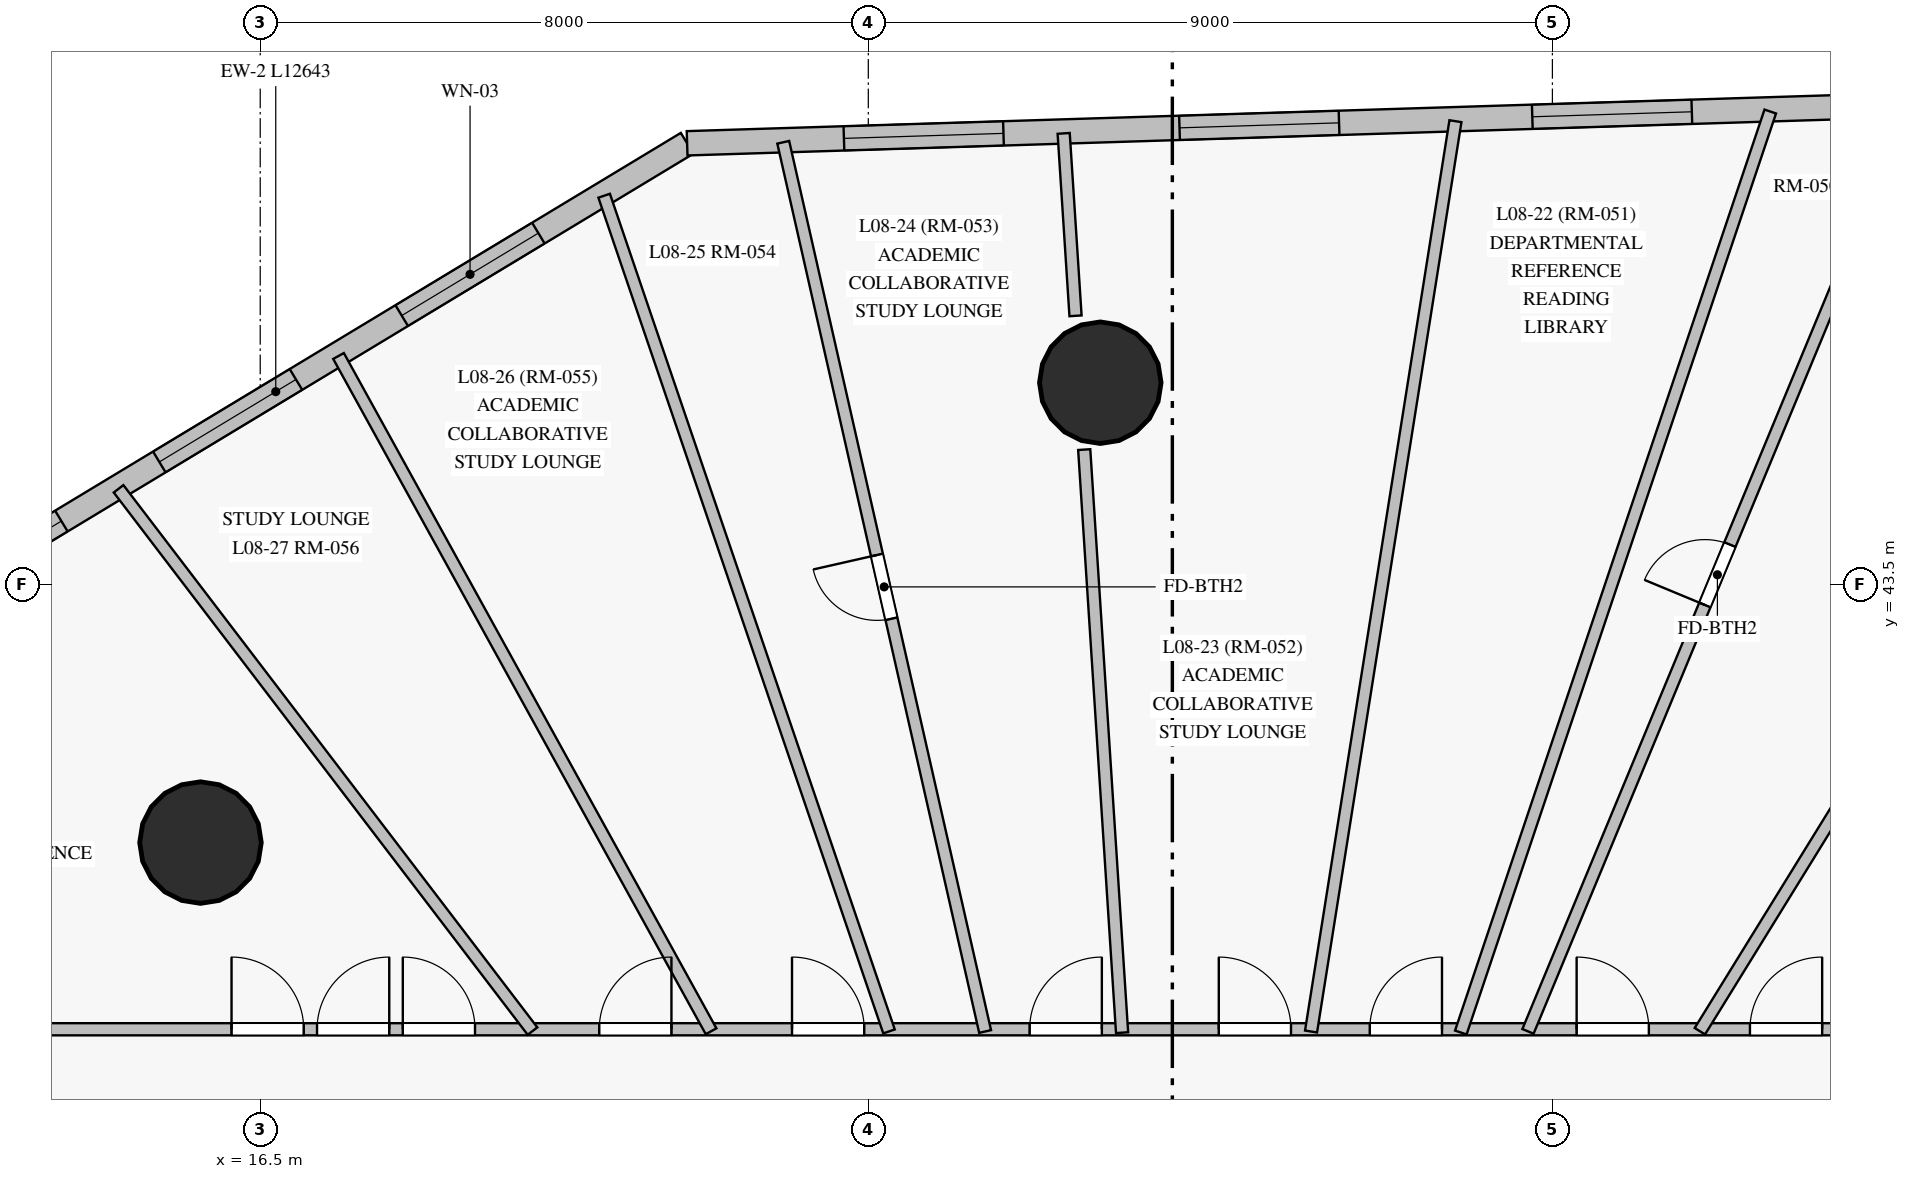
"""IFC4 building model, lengths in metres.
Left out: names, types, materials, properties, quantities, classifications, styles, units other than length and angle.
Written with IfcOpenShell. Run it as: python <this file> out.ifc"""

import sys

from ifc_helpers import new_model, si_unit, direction, frame, frame_2d, origin, origin_with_axes, origin_2d, place, context, subcontext, project, spatial, rectangle, circle, extrude, source, transform, mapped, element, fill, save


model = new_model("IFC4")
c1 = context("Model", 3, precision=1e-05, world=origin(), true_north=direction((0.0, 1.0)))
c2 = subcontext(c1, "Body", "Model", "MODEL_VIEW")
j1 = project(units=[si_unit("LENGTHUNIT", "METRE"), si_unit("PLANEANGLEUNIT", "RADIAN")], contexts=[c1])
p1 = place(None, origin())
s1 = spatial("IfcSite", under=j1, at=p1, CompositionType="ELEMENT")
p2 = place(p1, origin())
s2 = spatial("IfcBuilding", under=s1, at=p2, CompositionType="ELEMENT")
p3 = place(p2, frame((0.0, 0.0, 33.7)))
s3 = spatial("IfcBuildingStorey", under=s2, at=p3, CompositionType="ELEMENT", Elevation=33.7)
m1 = source(origin_with_axes(), c2, "Body", "SweptSolid", [
    extrude(circle(Radius=0.8, at=origin_2d()), origin(), (0.0, 0.0, 1.0), 3.6),
])
for number, where, z_axis, x_axis in (
    (1, (27.552, 46.156, 0.0), (0.0, 0.0, 1.0), (1.0, 0.0, 0.0)),
    (2, (15.714, 40.106, 0.0), (0.0, 0.0, 1.0), (1.0, 0.0, 0.0)),
):
    element("IfcColumn", number, at=place(p3, frame(where, z_axis=z_axis, x_axis=x_axis)), inside=s3, PredefinedType="COLUMN", context=c2, shape_type="MappedRepresentation", body=[
        mapped(m1, transform((0.0, 0.0, 0.0), scale=1.0)),
    ])
p4 = place(p3, frame((22.116, 49.306, 0.0), z_axis=(0.0, 0.0, 1.0), x_axis=(-0.856078953707, -0.516845068681, 0.0)))
e3 = element("IfcWall", 3, at=p4, inside=s3, PredefinedType="SOLIDWALL", context=c2, shape_type="SweptSolid", body=[
    extrude(rectangle(XDim=12.643, YDim=0.32, at=frame_2d((6.322, 0.0))), origin(), (0.0, 0.0, 1.0), 3.35),
])
p5 = place(p4, frame((2.286, 0.0, 0.85)))
e4 = element("IfcOpeningElement", 4, at=p5, cuts=e3, PredefinedType="OPENING", context=c2, shape_type="SweptSolid", body=[
    extrude(rectangle(XDim=2.1, YDim=1.95, at=frame_2d((1.05, 0.975))), frame((0.0, 0.17, 0.0), z_axis=(0.0, -1.0, 0.0), x_axis=(1.0, 0.0, 0.0)), (0.0, 0.0, 1.0), 0.34),
])
p6 = place(p4, frame((6.011, 0.0, 0.85)))
e5 = element("IfcOpeningElement", 5, at=p6, cuts=e3, PredefinedType="OPENING", context=c2, shape_type="SweptSolid", body=[
    extrude(rectangle(XDim=2.1, YDim=1.95, at=frame_2d((1.05, 0.975))), frame((0.0, 0.17, 0.0), z_axis=(0.0, -1.0, 0.0), x_axis=(1.0, 0.0, 0.0)), (0.0, 0.0, 1.0), 0.34),
])
p7 = place(p4, frame((9.616, 0.0, 0.85)))
e6 = element("IfcOpeningElement", 6, at=p7, cuts=e3, PredefinedType="OPENING", context=c2, shape_type="SweptSolid", body=[
    extrude(rectangle(XDim=2.1, YDim=1.95, at=frame_2d((1.05, 0.975))), frame((0.0, 0.17, 0.0), z_axis=(0.0, -1.0, 0.0), x_axis=(1.0, 0.0, 0.0)), (0.0, 0.0, 1.0), 0.34),
])
p8 = place(p3, frame((37.845, 49.799, 0.0), z_axis=(0.0, 0.0, 1.0), x_axis=(-0.999508801206, -0.031339373191, 0.0)))
e7 = element("IfcWall", 7, at=p8, inside=s3, PredefinedType="SOLIDWALL", context=c2, shape_type="SweptSolid", body=[
    extrude(rectangle(XDim=15.736, YDim=0.32, at=frame_2d((7.868, 0.0))), origin(), (0.0, 0.0, 1.0), 3.35),
])
p9 = place(p8, frame((2.511, 0.0, 0.85)))
e8 = element("IfcOpeningElement", 8, at=p9, cuts=e7, PredefinedType="OPENING", context=c2, shape_type="SweptSolid", body=[
    extrude(rectangle(XDim=2.1, YDim=1.95, at=frame_2d((1.05, 0.975))), frame((0.0, 0.17, 0.0), z_axis=(0.0, -1.0, 0.0), x_axis=(1.0, 0.0, 0.0)), (0.0, 0.0, 1.0), 0.34),
])
p10 = place(p8, frame((7.155, 0.0, 0.85)))
e9 = element("IfcOpeningElement", 9, at=p10, cuts=e7, PredefinedType="OPENING", context=c2, shape_type="SweptSolid", body=[
    extrude(rectangle(XDim=2.1, YDim=1.95, at=frame_2d((1.05, 0.975))), frame((0.0, 0.17, 0.0), z_axis=(0.0, -1.0, 0.0), x_axis=(1.0, 0.0, 0.0)), (0.0, 0.0, 1.0), 0.34),
])
p11 = place(p8, frame((11.572, 0.0, 0.85)))
e10 = element("IfcOpeningElement", 10, at=p11, cuts=e7, PredefinedType="OPENING", context=c2, shape_type="SweptSolid", body=[
    extrude(rectangle(XDim=2.1, YDim=1.95, at=frame_2d((1.05, 0.975))), frame((0.0, 0.17, 0.0), z_axis=(0.0, -1.0, 0.0), x_axis=(1.0, 0.0, 0.0)), (0.0, 0.0, 1.0), 0.34),
])
p12 = place(p3, frame((10.5, 37.65, 0.0), z_axis=(0.0, 0.0, 1.0), x_axis=(1.0, 0.0, 0.0)))
e11 = element("IfcWall", 11, at=p12, inside=s3, PredefinedType="PARTITIONING", context=c2, shape_type="SweptSolid", body=[
    extrude(rectangle(XDim=29.75, YDim=0.16, at=frame_2d((14.875, 0.0))), origin(), (0.0, 0.0, 1.0), 2.75),
])
p13 = place(p12, frame((28.008, 0.0, 0.0)))
e12 = element("IfcOpeningElement", 12, at=p13, cuts=e11, PredefinedType="OPENING", context=c2, shape_type="SweptSolid", body=[
    extrude(rectangle(XDim=0.95, YDim=2.15, at=frame_2d((0.475, 1.075))), frame((0.0, 0.09, 0.0), z_axis=(0.0, -1.0, 0.0), x_axis=(1.0, 0.0, 0.0)), (0.0, 0.0, 1.0), 0.18),
])
p14 = place(p12, frame((25.599, 0.0, 0.0)))
e13 = element("IfcOpeningElement", 13, at=p14, cuts=e11, PredefinedType="OPENING", context=c2, shape_type="SweptSolid", body=[
    extrude(rectangle(XDim=0.95, YDim=2.15, at=frame_2d((0.475, 1.075))), frame((0.0, 0.09, 0.0), z_axis=(0.0, -1.0, 0.0), x_axis=(1.0, 0.0, 0.0)), (0.0, 0.0, 1.0), 0.18),
])
p15 = place(p12, frame((23.319, 0.0, 0.0)))
e14 = element("IfcOpeningElement", 14, at=p15, cuts=e11, PredefinedType="OPENING", context=c2, shape_type="SweptSolid", body=[
    extrude(rectangle(XDim=0.95, YDim=2.15, at=frame_2d((0.475, 1.075))), frame((0.0, 0.09, 0.0), z_axis=(0.0, -1.0, 0.0), x_axis=(1.0, 0.0, 0.0)), (0.0, 0.0, 1.0), 0.18),
])
p16 = place(p12, frame((20.597, 0.0, 0.0)))
e15 = element("IfcOpeningElement", 15, at=p16, cuts=e11, PredefinedType="OPENING", context=c2, shape_type="SweptSolid", body=[
    extrude(rectangle(XDim=0.95, YDim=2.15, at=frame_2d((0.475, 1.075))), frame((0.0, 0.09, 0.0), z_axis=(0.0, -1.0, 0.0), x_axis=(1.0, 0.0, 0.0)), (0.0, 0.0, 1.0), 0.18),
])
p17 = place(p12, frame((18.611, 0.0, 0.0)))
e16 = element("IfcOpeningElement", 16, at=p17, cuts=e11, PredefinedType="OPENING", context=c2, shape_type="SweptSolid", body=[
    extrude(rectangle(XDim=0.95, YDim=2.15, at=frame_2d((0.475, 1.075))), frame((0.0, 0.09, 0.0), z_axis=(0.0, -1.0, 0.0), x_axis=(1.0, 0.0, 0.0)), (0.0, 0.0, 1.0), 0.18),
])
p18 = place(p12, frame((16.123, 0.0, 0.0)))
e17 = element("IfcOpeningElement", 17, at=p18, cuts=e11, PredefinedType="OPENING", context=c2, shape_type="SweptSolid", body=[
    extrude(rectangle(XDim=0.95, YDim=2.15, at=frame_2d((0.475, 1.075))), frame((0.0, 0.09, 0.0), z_axis=(0.0, -1.0, 0.0), x_axis=(1.0, 0.0, 0.0)), (0.0, 0.0, 1.0), 0.18),
])
p19 = place(p12, frame((12.996, 0.0, 0.0)))
e18 = element("IfcOpeningElement", 18, at=p19, cuts=e11, PredefinedType="OPENING", context=c2, shape_type="SweptSolid", body=[
    extrude(rectangle(XDim=0.95, YDim=2.15, at=frame_2d((0.475, 1.075))), frame((0.0, 0.09, 0.0), z_axis=(0.0, -1.0, 0.0), x_axis=(1.0, 0.0, 0.0)), (0.0, 0.0, 1.0), 0.18),
])
p20 = place(p12, frame((10.46, 0.0, 0.0)))
e19 = element("IfcOpeningElement", 19, at=p20, cuts=e11, PredefinedType="OPENING", context=c2, shape_type="SweptSolid", body=[
    extrude(rectangle(XDim=0.95, YDim=2.15, at=frame_2d((0.475, 1.075))), frame((0.0, 0.09, 0.0), z_axis=(0.0, -1.0, 0.0), x_axis=(1.0, 0.0, 0.0)), (0.0, 0.0, 1.0), 0.18),
])
p21 = place(p12, frame((7.876, 0.0, 0.0)))
e20 = element("IfcOpeningElement", 20, at=p21, cuts=e11, PredefinedType="OPENING", context=c2, shape_type="SweptSolid", body=[
    extrude(rectangle(XDim=0.95, YDim=2.15, at=frame_2d((0.475, 1.075))), frame((0.0, 0.09, 0.0), z_axis=(0.0, -1.0, 0.0), x_axis=(1.0, 0.0, 0.0)), (0.0, 0.0, 1.0), 0.18),
])
p22 = place(p12, frame((6.748, 0.0, 0.0)))
e21 = element("IfcOpeningElement", 21, at=p22, cuts=e11, PredefinedType="OPENING", context=c2, shape_type="SweptSolid", body=[
    extrude(rectangle(XDim=0.95, YDim=2.15, at=frame_2d((0.475, 1.075))), frame((0.0, 0.09, 0.0), z_axis=(0.0, -1.0, 0.0), x_axis=(1.0, 0.0, 0.0)), (0.0, 0.0, 1.0), 0.18),
])
p23 = place(p12, frame((5.623, 0.0, 0.0)))
e22 = element("IfcOpeningElement", 22, at=p23, cuts=e11, PredefinedType="OPENING", context=c2, shape_type="SweptSolid", body=[
    extrude(rectangle(XDim=0.95, YDim=2.15, at=frame_2d((0.475, 1.075))), frame((0.0, 0.09, 0.0), z_axis=(0.0, -1.0, 0.0), x_axis=(1.0, 0.0, 0.0)), (0.0, 0.0, 1.0), 0.18),
])
p24 = place(p3, frame((33.179, 37.622, 0.0), z_axis=(0.0, 0.0, 1.0), x_axis=(0.383172838405, 0.923676661992, 0.0)))
e23 = element("IfcWall", 23, at=p24, inside=s3, PredefinedType="PARTITIONING", context=c2, shape_type="SweptSolid", body=[
    extrude(rectangle(XDim=13.007, YDim=0.16, at=frame_2d((6.503, 0.0))), origin(), (0.0, 0.0, 1.0), 3.35),
])
p25 = place(p24, frame((6.073, 0.0, 0.0)))
e24 = element("IfcOpeningElement", 24, at=p25, cuts=e23, PredefinedType="OPENING", context=c2, shape_type="SweptSolid", body=[
    extrude(rectangle(XDim=0.86, YDim=2.04, at=frame_2d((0.43, 1.02))), frame((0.0, 0.09, 0.0), z_axis=(0.0, -1.0, 0.0), x_axis=(1.0, 0.0, 0.0)), (0.0, 0.0, 1.0), 0.18),
])
p26 = place(p3, frame((32.295, 37.607, 0.0), z_axis=(0.0, 0.0, 1.0), x_axis=(0.318501732795, 0.947922278569, 0.0)))
e25 = element("IfcWall", 25, at=p26, inside=s3, PredefinedType="PARTITIONING", context=c2, shape_type="SweptSolid", body=[
    extrude(rectangle(XDim=12.782, YDim=0.16, at=frame_2d((6.391, 0.0))), origin(), (0.0, 0.0, 1.0), 3.35),
])
p27 = place(p3, frame((35.44, 37.625, 0.0), z_axis=(0.0, 0.0, 1.0), x_axis=(0.525421629301, 0.850842001468, 0.0)))
e26 = element("IfcWall", 26, at=p27, inside=s3, PredefinedType="PARTITIONING", context=c2, shape_type="SweptSolid", body=[
    extrude(rectangle(XDim=12.256, YDim=0.16, at=frame_2d((6.128, 0.0))), origin(), (0.0, 0.0, 1.0), 3.35),
])
p28 = place(p3, frame((30.325, 37.62, 0.0), z_axis=(0.0, 0.0, 1.0), x_axis=(0.156659374138, 0.987652692243, 0.0)))
e27 = element("IfcWall", 27, at=p28, inside=s3, PredefinedType="PARTITIONING", context=c2, shape_type="SweptSolid", body=[
    extrude(rectangle(XDim=12.126, YDim=0.16, at=frame_2d((6.063, 0.0))), origin(), (0.0, 0.0, 1.0), 3.35),
])
p29 = place(p3, frame((26.037, 37.621, 0.0), z_axis=(0.0, 0.0, 1.0), x_axis=(-0.221403828969, 0.975182210932, 0.0)))
e28 = element("IfcWall", 28, at=p29, inside=s3, PredefinedType="PARTITIONING", context=c2, shape_type="SweptSolid", body=[
    extrude(rectangle(XDim=11.996, YDim=0.16, at=frame_2d((5.998, 0.0))), origin(), (0.0, 0.0, 1.0), 3.35),
])
p30 = place(p29, frame((5.568, 0.0, 0.0)))
e29 = element("IfcOpeningElement", 29, at=p30, cuts=e28, PredefinedType="OPENING", context=c2, shape_type="SweptSolid", body=[
    extrude(rectangle(XDim=0.86, YDim=2.04, at=frame_2d((0.43, 1.02))), frame((0.0, 0.09, 0.0), z_axis=(0.0, -1.0, 0.0), x_axis=(1.0, 0.0, 0.0)), (0.0, 0.0, 1.0), 0.18),
])
p31 = place(p3, frame((24.772, 37.622, 0.0), z_axis=(0.0, 0.0, 1.0), x_axis=(-0.322633271711, 0.94652404723, 0.0)))
e30 = element("IfcWall", 30, at=p31, inside=s3, PredefinedType="PARTITIONING", context=c2, shape_type="SweptSolid", body=[
    extrude(rectangle(XDim=11.615, YDim=0.16, at=frame_2d((5.808, 0.0))), origin(), (0.0, 0.0, 1.0), 3.35),
])
p32 = place(p3, frame((22.432, 37.624, 0.0), z_axis=(0.0, 0.0, 1.0), x_axis=(-0.483064621036, 0.875584702872, 0.0)))
e31 = element("IfcWall", 31, at=p32, inside=s3, PredefinedType="PARTITIONING", context=c2, shape_type="SweptSolid", body=[
    extrude(rectangle(XDim=10.146, YDim=0.16, at=frame_2d((5.073, 0.0))), origin(), (0.0, 0.0, 1.0), 3.35),
])
p33 = place(p3, frame((20.082, 37.626, 0.0), z_axis=(0.0, 0.0, 1.0), x_axis=(-0.606772385427, 0.794875633218, 0.0)))
e32 = element("IfcWall", 32, at=p33, inside=s3, PredefinedType="PARTITIONING", context=c2, shape_type="SweptSolid", body=[
    extrude(rectangle(XDim=8.975, YDim=0.16, at=frame_2d((4.488, 0.0))), origin(), (0.0, 0.0, 1.0), 3.35),
])
p34 = place(p3, frame((27.839, 37.605, 0.0), z_axis=(0.0, 0.0, 1.0), x_axis=(-0.064822006833, 0.997896842078, 0.0)))
e33 = element("IfcWall", 33, at=p34, inside=s3, PredefinedType="PARTITIONING", context=c2, shape_type="SweptSolid", body=[
    extrude(rectangle(XDim=7.687, YDim=0.16, at=frame_2d((3.844, 0.0))), origin(), (0.0, 0.0, 1.0), 2.7),
])
p35 = place(p3, frame((27.226, 47.036, 0.0), z_axis=(0.0, 0.0, 1.0), x_axis=(-0.064861604916, 0.997894269052, 0.0)))
e34 = element("IfcWall", 34, at=p35, inside=s3, PredefinedType="PARTITIONING", context=c2, shape_type="SweptSolid", body=[
    extrude(rectangle(XDim=2.405, YDim=0.16, at=frame_2d((1.203, 0.0))), origin(), (0.0, 0.0, 1.0), 3.35),
])
m2 = source(origin_with_axes(), c2, "Body", "SweptSolid", [
    extrude(rectangle(XDim=2.1, YDim=1.95, at=frame_2d((1.05, 0.975))), frame((0.0, 0.03, 0.0), z_axis=(0.0, -1.0, 0.0), x_axis=(1.0, 0.0, 0.0)), (0.0, 0.0, 1.0), 0.06),
])
p36 = place(p5, origin())
e35 = element("IfcWindow", 35, at=p36, inside=s3, PartitioningType="SINGLE_PANEL", PredefinedType="WINDOW", context=c2, shape_type="MappedRepresentation", body=[
    mapped(m2, transform((0.0, 0.0, 0.0), scale=1.0)),
])
fill(e4, e35)
p37 = place(p6, origin())
e36 = element("IfcWindow", 36, at=p37, inside=s3, PartitioningType="SINGLE_PANEL", PredefinedType="WINDOW", context=c2, shape_type="MappedRepresentation", body=[
    mapped(m2, transform((0.0, 0.0, 0.0), scale=1.0)),
])
fill(e5, e36)
p38 = place(p7, origin())
e37 = element("IfcWindow", 37, at=p38, inside=s3, PartitioningType="SINGLE_PANEL", PredefinedType="WINDOW", context=c2, shape_type="MappedRepresentation", body=[
    mapped(m2, transform((0.0, 0.0, 0.0), scale=1.0)),
])
fill(e6, e37)
p39 = place(p9, origin())
e38 = element("IfcWindow", 38, at=p39, inside=s3, PartitioningType="SINGLE_PANEL", PredefinedType="WINDOW", context=c2, shape_type="MappedRepresentation", body=[
    mapped(m2, transform((0.0, 0.0, 0.0), scale=1.0)),
])
fill(e8, e38)
p40 = place(p10, origin())
e39 = element("IfcWindow", 39, at=p40, inside=s3, PartitioningType="SINGLE_PANEL", PredefinedType="WINDOW", context=c2, shape_type="MappedRepresentation", body=[
    mapped(m2, transform((0.0, 0.0, 0.0), scale=1.0)),
])
fill(e9, e39)
p41 = place(p11, origin())
e40 = element("IfcWindow", 40, at=p41, inside=s3, PartitioningType="SINGLE_PANEL", PredefinedType="WINDOW", context=c2, shape_type="MappedRepresentation", body=[
    mapped(m2, transform((0.0, 0.0, 0.0), scale=1.0)),
])
fill(e10, e40)
m3 = source(origin_with_axes(), c2, "Body", "SweptSolid", [
    extrude(rectangle(XDim=0.95, YDim=2.15, at=frame_2d((0.475, 1.075))), frame((0.0, 0.025, 0.0), z_axis=(0.0, -1.0, 0.0), x_axis=(1.0, 0.0, 0.0)), (0.0, 0.0, 1.0), 0.05),
])
p42 = place(p14, origin())
e41 = element("IfcDoor", 41, at=p42, inside=s3, OperationType="SINGLE_SWING_RIGHT", PredefinedType="DOOR", context=c2, shape_type="MappedRepresentation", body=[
    mapped(m3, transform((0.0, 0.0, 0.0), scale=1.0)),
])
fill(e13, e41)
p43 = place(p15, origin())
e42 = element("IfcDoor", 42, at=p43, inside=s3, OperationType="SINGLE_SWING_LEFT", PredefinedType="DOOR", context=c2, shape_type="MappedRepresentation", body=[
    mapped(m3, transform((0.0, 0.0, 0.0), scale=1.0)),
])
fill(e14, e42)
p44 = place(p16, origin())
e43 = element("IfcDoor", 43, at=p44, inside=s3, OperationType="SINGLE_SWING_RIGHT", PredefinedType="DOOR", context=c2, shape_type="MappedRepresentation", body=[
    mapped(m3, transform((0.0, 0.0, 0.0), scale=1.0)),
])
fill(e15, e43)
p45 = place(p17, origin())
e44 = element("IfcDoor", 44, at=p45, inside=s3, OperationType="SINGLE_SWING_LEFT", PredefinedType="DOOR", context=c2, shape_type="MappedRepresentation", body=[
    mapped(m3, transform((0.0, 0.0, 0.0), scale=1.0)),
])
fill(e16, e44)
p46 = place(p18, origin())
e45 = element("IfcDoor", 45, at=p46, inside=s3, OperationType="SINGLE_SWING_RIGHT", PredefinedType="DOOR", context=c2, shape_type="MappedRepresentation", body=[
    mapped(m3, transform((0.0, 0.0, 0.0), scale=1.0)),
])
fill(e17, e45)
p47 = place(p19, origin())
e46 = element("IfcDoor", 46, at=p47, inside=s3, OperationType="SINGLE_SWING_LEFT", PredefinedType="DOOR", context=c2, shape_type="MappedRepresentation", body=[
    mapped(m3, transform((0.0, 0.0, 0.0), scale=1.0)),
])
fill(e18, e46)
p48 = place(p20, origin())
e47 = element("IfcDoor", 47, at=p48, inside=s3, OperationType="SINGLE_SWING_RIGHT", PredefinedType="DOOR", context=c2, shape_type="MappedRepresentation", body=[
    mapped(m3, transform((0.0, 0.0, 0.0), scale=1.0)),
])
fill(e19, e47)
p49 = place(p21, origin())
e48 = element("IfcDoor", 48, at=p49, inside=s3, OperationType="SINGLE_SWING_LEFT", PredefinedType="DOOR", context=c2, shape_type="MappedRepresentation", body=[
    mapped(m3, transform((0.0, 0.0, 0.0), scale=1.0)),
])
fill(e20, e48)
p50 = place(p22, origin())
e49 = element("IfcDoor", 49, at=p50, inside=s3, OperationType="SINGLE_SWING_RIGHT", PredefinedType="DOOR", context=c2, shape_type="MappedRepresentation", body=[
    mapped(m3, transform((0.0, 0.0, 0.0), scale=1.0)),
])
fill(e21, e49)
p51 = place(p23, origin())
e50 = element("IfcDoor", 50, at=p51, inside=s3, OperationType="SINGLE_SWING_LEFT", PredefinedType="DOOR", context=c2, shape_type="MappedRepresentation", body=[
    mapped(m3, transform((0.0, 0.0, 0.0), scale=1.0)),
])
fill(e22, e50)
m4 = source(origin_with_axes(), c2, "Body", "SweptSolid", [
    extrude(rectangle(XDim=0.86, YDim=2.04, at=frame_2d((0.43, 1.02))), frame((0.0, 0.025, 0.0), z_axis=(0.0, -1.0, 0.0), x_axis=(1.0, 0.0, 0.0)), (0.0, 0.0, 1.0), 0.05),
])
p52 = place(p25, origin())
e51 = element("IfcDoor", 51, at=p52, inside=s3, OperationType="SINGLE_SWING_LEFT", PredefinedType="DOOR", context=c2, shape_type="MappedRepresentation", body=[
    mapped(m4, transform((0.0, 0.0, 0.0), scale=1.0)),
])
fill(e24, e51)
p53 = place(p30, origin())
e52 = element("IfcDoor", 52, at=p53, inside=s3, OperationType="SINGLE_SWING_RIGHT", PredefinedType="DOOR", context=c2, shape_type="MappedRepresentation", body=[
    mapped(m4, transform((0.0, 0.0, 0.0), scale=1.0)),
])
fill(e29, e52)
save(model, sys.argv[1])
